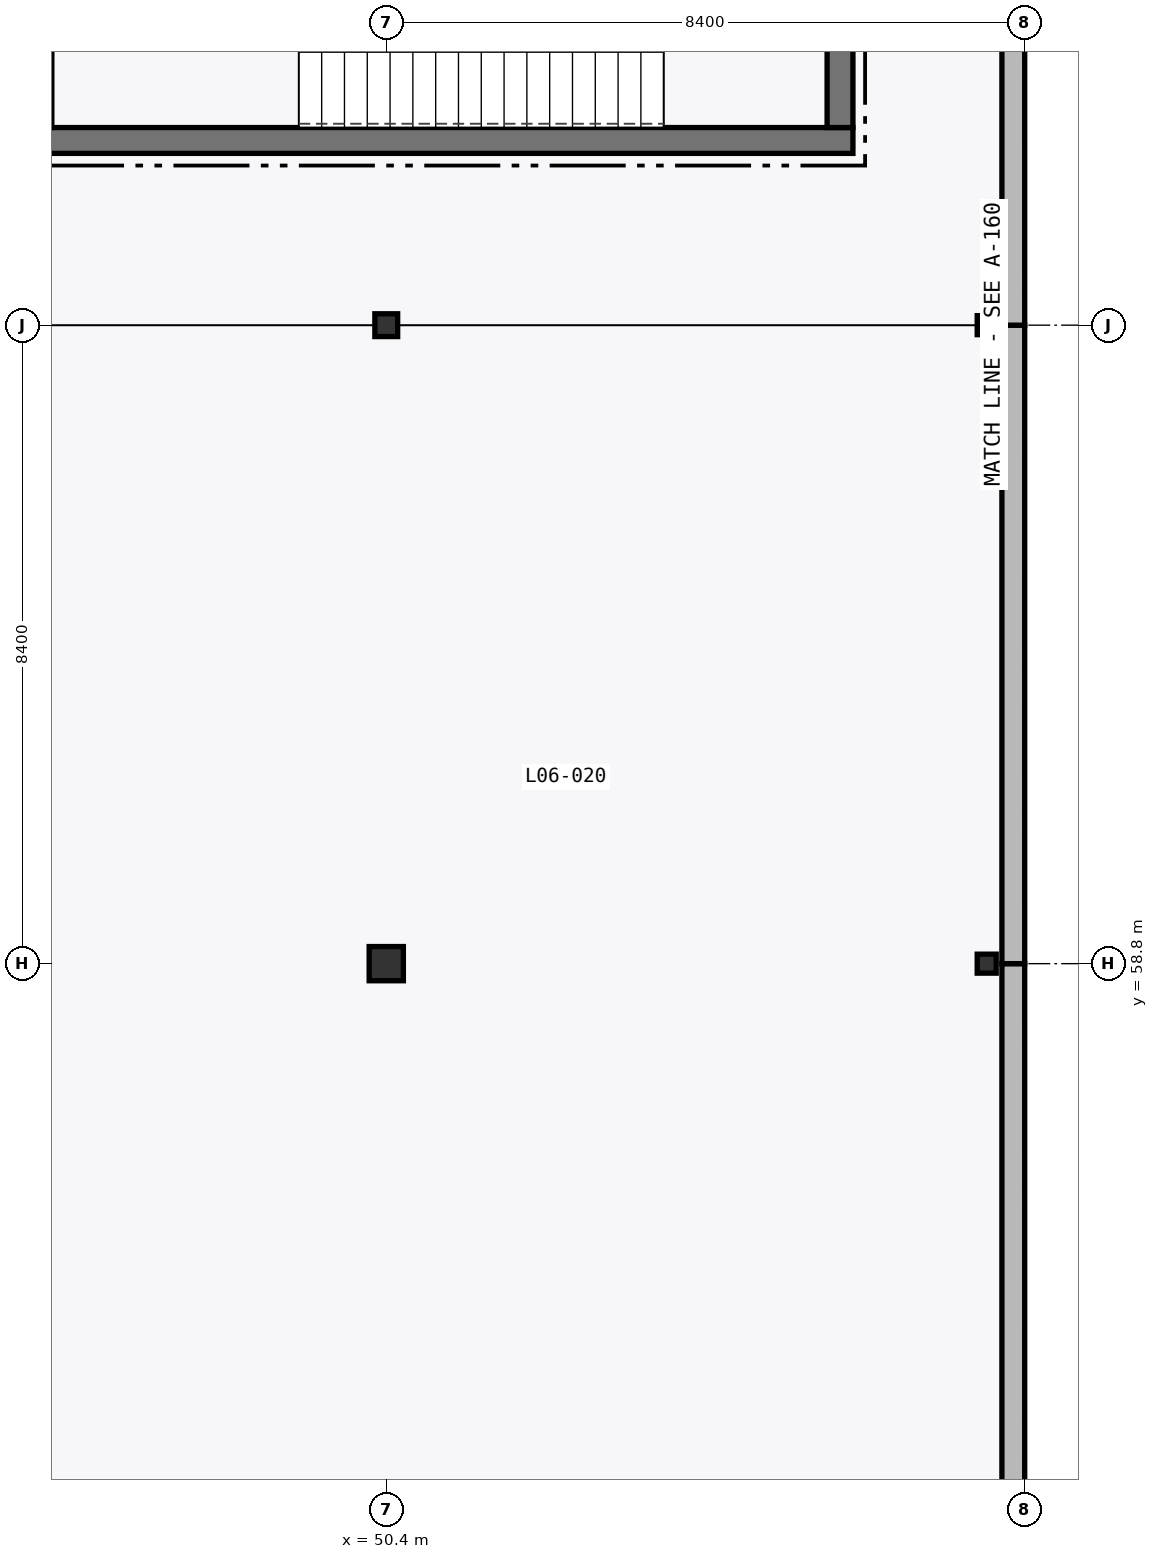
"""IFC4 building model, lengths in metres.
Left out: names, types, materials, properties, quantities, classifications, styles, units other than length and angle.
Written with IfcOpenShell. Run it as: python <this file> out.ifc"""

import sys

from ifc_helpers import new_model, si_unit, direction, frame, frame_2d, origin, origin_2d, place, context, subcontext, project, spatial, rectangle, hollow_rectangle, i_section, extrude, element, save


model = new_model("IFC4")
c1 = context("Model", 3, precision=1e-05, world=origin(), true_north=direction((0.0, 1.0)))
c2 = subcontext(c1, "Body", "Model", "MODEL_VIEW")
j1 = project(units=[si_unit("LENGTHUNIT", "METRE"), si_unit("PLANEANGLEUNIT", "RADIAN")], contexts=[c1])
p1 = place(None, origin())
s1 = spatial("IfcSite", under=j1, at=p1, CompositionType="ELEMENT")
p2 = place(p1, origin())
s2 = spatial("IfcBuilding", under=s1, at=p2, CompositionType="ELEMENT")
p3 = place(p2, frame((0.0, 0.0, 26.7)))
s3 = spatial("IfcBuildingStorey", under=s2, at=p3, CompositionType="ELEMENT", Elevation=26.7)
p4 = place(p3, frame((50.4, 58.8, 0.0), z_axis=(0.0, 0.0, 1.0), x_axis=(1.0, 0.0, 0.0)))
e1 = element("IfcColumn", 1, at=p4, inside=s3, PredefinedType="COLUMN", context=c2, shape_type="SweptSolid", body=[
    extrude(hollow_rectangle(XDim=0.45, YDim=0.45, WallThickness=0.018, at=origin_2d()), origin(), (0.0, 0.0, 1.0), 5.1),
])
p5 = place(p3, frame((50.4, 67.2, 0.0), z_axis=(0.0, 0.0, 1.0), x_axis=(1.0, 0.0, 0.0)))
e2 = element("IfcColumn", 2, at=p5, inside=s3, PredefinedType="COLUMN", context=c2, shape_type="SweptSolid", body=[
    extrude(i_section(OverallWidth=0.3, OverallDepth=0.3, WebThickness=0.01, FlangeThickness=0.015, FilletRadius=0.018, at=origin_2d()), origin(), (0.0, 0.0, 1.0), 5.1),
])
for number, where, z_axis, x_axis in (
    (3, (58.3, 58.8, 0.0), (0.0, 0.0, 1.0), (1.0, 0.0, 0.0)),
    (4, (58.3, 67.2, 0.0), (0.0, 0.0, 1.0), (1.0, 0.0, 0.0)),
):
    element("IfcColumn", number, at=place(p3, frame(where, z_axis=z_axis, x_axis=x_axis)), inside=s3, PredefinedType="COLUMN", context=c2, shape_type="SweptSolid", body=[
        extrude(i_section(OverallWidth=0.25, OverallDepth=0.25, WebThickness=0.009, FlangeThickness=0.014, FilletRadius=0.016, at=origin_2d()), origin(), (0.0, 0.0, 1.0), 5.1),
    ])
p6 = place(p3, frame((58.65, 50.4, 0.0), z_axis=(0.0, 0.0, 1.0), x_axis=(0.0, 1.0, 0.0)))
e5 = element("IfcWall", 5, at=p6, inside=s3, PredefinedType="STANDARD", context=c2, shape_type="SweptSolid", body=[
    extrude(rectangle(XDim=8.4, YDim=0.3, at=frame_2d((4.2, 0.0))), origin(), (0.0, 0.0, 1.0), 4.397),
])
p7 = place(p3, frame((58.65, 58.8, 0.0), z_axis=(0.0, 0.0, 1.0), x_axis=(0.0, 1.0, 0.0)))
e6 = element("IfcWall", 6, at=p7, inside=s3, PredefinedType="STANDARD", context=c2, shape_type="SweptSolid", body=[
    extrude(rectangle(XDim=8.4, YDim=0.3, at=frame_2d((4.2, 0.0))), origin(), (0.0, 0.0, 1.0), 4.397),
])
p8 = place(p3, frame((58.65, 67.2, 0.0), z_axis=(0.0, 0.0, 1.0), x_axis=(0.0, 1.0, 0.0)))
e7 = element("IfcWall", 7, at=p8, inside=s3, PredefinedType="STANDARD", context=c2, shape_type="SweptSolid", body=[
    extrude(rectangle(XDim=8.4, YDim=0.3, at=frame_2d((4.2, 0.0))), origin(), (0.0, 0.0, 1.0), 4.397),
])
p9 = place(p3, frame((45.66, 69.63, 0.0), z_axis=(0.0, 0.0, 1.0), x_axis=(1.0, 0.0, 0.0)))
e8 = element("IfcWall", 8, at=p9, inside=s3, PredefinedType="SHEAR", context=c2, shape_type="SweptSolid", body=[
    extrude(rectangle(XDim=10.88, YDim=0.34, at=frame_2d((5.44, 0.0))), origin(), (0.0, 0.0, 1.0), 4.845),
])
p10 = place(p3, frame((56.37, 69.8, 0.0), z_axis=(0.0, 0.0, 1.0), x_axis=(0.0, 1.0, 0.0)))
e9 = element("IfcWall", 9, at=p10, inside=s3, PredefinedType="SHEAR", context=c2, shape_type="SweptSolid", body=[
    extrude(rectangle(XDim=4.2, YDim=0.34, at=frame_2d((2.1, 0.0))), origin(), (0.0, 0.0, 1.0), 4.845),
])
p11 = place(p10, frame((1.35, 0.0, 0.0)))
e10 = element("IfcOpeningElement", 10, at=p11, cuts=e9, PredefinedType="OPENING", context=c2, shape_type="SweptSolid", body=[
    extrude(rectangle(XDim=1.5, YDim=2.15, at=frame_2d((0.75, 1.075))), frame((0.0, 0.18, 0.0), z_axis=(0.0, -1.0, 0.0), x_axis=(1.0, 0.0, 0.0)), (0.0, 0.0, 1.0), 0.36),
])
save(model, sys.argv[1])
